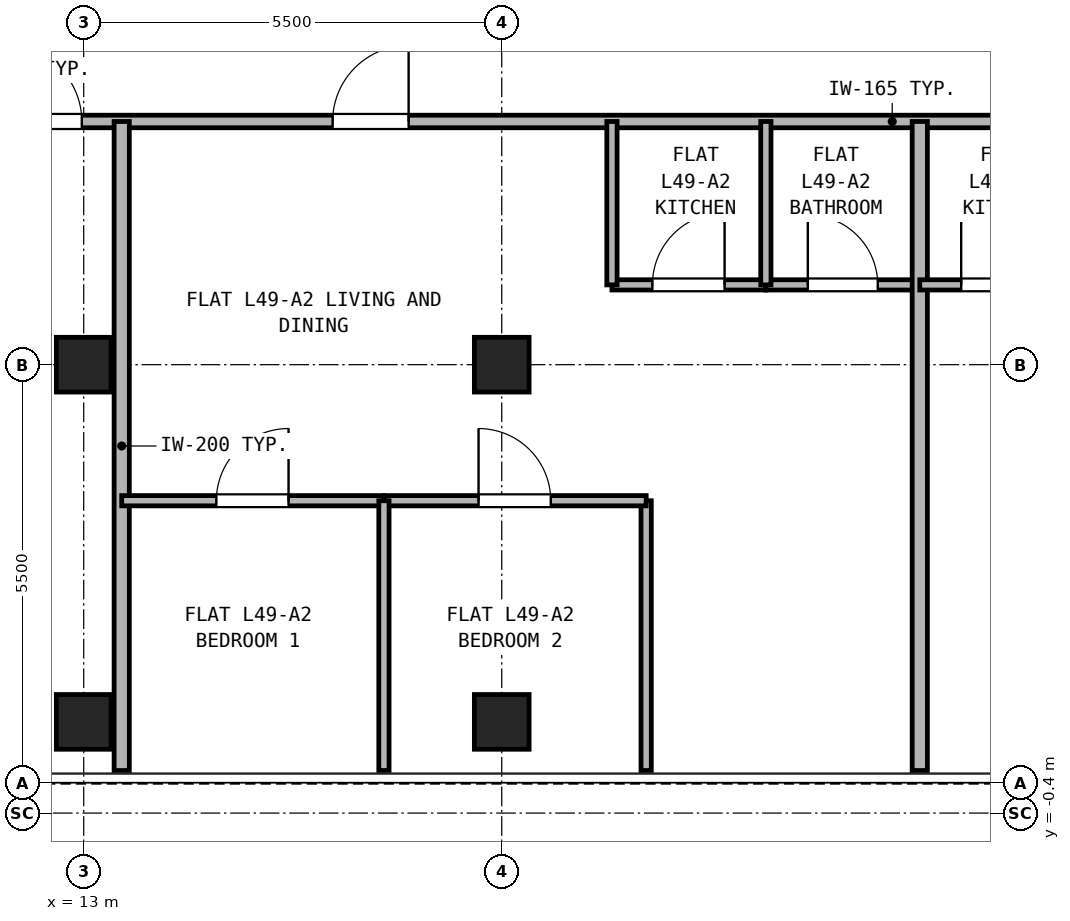
"""IFC4 building model, lengths in metres.
Left out: names, types, materials, properties, quantities, classifications, styles, units other than length and angle.
Written with IfcOpenShell. Run it as: python <this file> out.ifc"""

import sys

from ifc_helpers import new_model, si_unit, direction, frame, frame_2d, origin, origin_2d, place, context, subcontext, project, spatial, rectangle, hollow_rectangle, extrude, source, transform, mapped, element, fill, save


model = new_model("IFC4")
c1 = context("Model", 3, precision=1e-05, world=origin(), true_north=direction((0.0, 1.0)))
c2 = subcontext(c1, "Body", "Model", "MODEL_VIEW")
j1 = project(units=[si_unit("LENGTHUNIT", "METRE"), si_unit("PLANEANGLEUNIT", "RADIAN")], contexts=[c1])
p1 = place(None, origin())
s1 = spatial("IfcSite", under=j1, at=p1, CompositionType="ELEMENT")
p2 = place(p1, origin())
s2 = spatial("IfcBuilding", under=s1, at=p2, CompositionType="ELEMENT")
p3 = place(p2, frame((0.0, 0.0, 175.3)))
s3 = spatial("IfcBuildingStorey", under=s2, at=p3, CompositionType="ELEMENT", Elevation=175.3)
m1 = source(origin(), c2, "Body", "SweptSolid", [
    extrude(hollow_rectangle(XDim=0.72, YDim=0.72, WallThickness=0.04, at=origin_2d()), origin(), (0.0, 0.0, 1.0), 2.95),
])
for number, where, z_axis, x_axis in (
    (1, (13.0, 0.8, 0.0), (0.0, 0.0, 1.0), (1.0, 0.0, 0.0)),
    (2, (18.5, 0.8, 0.0), (0.0, 0.0, 1.0), (1.0, 0.0, 0.0)),
    (3, (13.0, 5.5, 0.0), (0.0, 0.0, 1.0), (1.0, 0.0, 0.0)),
    (4, (18.5, 5.5, 0.0), (0.0, 0.0, 1.0), (1.0, 0.0, 0.0)),
):
    element("IfcColumn", number, at=place(p3, frame(where, z_axis=z_axis, x_axis=x_axis)), inside=s3, PredefinedType="COLUMN", context=c2, shape_type="MappedRepresentation", body=[
        mapped(m1, transform((0.0, 0.0, 0.0), x_axis=(1.0, 0.0, 0.0), y_axis=(0.0, 1.0, 0.0), z_axis=(0.0, 0.0, 1.0), scale=1.0)),
    ])
p4 = place(p3, frame((0.16, 8.7, 0.0), z_axis=(0.0, 0.0, 1.0), x_axis=(1.0, 0.0, 0.0)))
e5 = element("IfcWall", 5, at=p4, inside=s3, PredefinedType="PARTITIONING", context=c2, shape_type="SweptSolid", body=[
    extrude(rectangle(XDim=41.48, YDim=0.165, at=frame_2d((20.74, 0.0))), origin(), (0.0, 0.0, 1.0), 2.583),
])
p5 = place(p4, frame((11.815, 0.0, 0.0)))
e6 = element("IfcOpeningElement", 6, at=p5, cuts=e5, PredefinedType="OPENING", context=c2, shape_type="SweptSolid", body=[
    extrude(rectangle(XDim=1.0, YDim=2.15, at=frame_2d((0.5, 1.075))), frame((0.0, 0.093, 0.0), z_axis=(0.0, -1.0, 0.0), x_axis=(1.0, 0.0, 0.0)), (0.0, 0.0, 1.0), 0.185),
])
p6 = place(p4, frame((16.115, 0.0, 0.0)))
e7 = element("IfcOpeningElement", 7, at=p6, cuts=e5, PredefinedType="OPENING", context=c2, shape_type="SweptSolid", body=[
    extrude(rectangle(XDim=1.0, YDim=2.15, at=frame_2d((0.5, 1.075))), frame((0.0, 0.093, 0.0), z_axis=(0.0, -1.0, 0.0), x_axis=(1.0, 0.0, 0.0)), (0.0, 0.0, 1.0), 0.185),
])
p7 = place(p4, frame((29.84, 0.0, 0.0)))
e8 = element("IfcOpeningElement", 8, at=p7, cuts=e5, PredefinedType="OPENING", context=c2, shape_type="SweptSolid", body=[
    extrude(rectangle(XDim=1.0, YDim=2.15, at=frame_2d((0.5, 1.075))), frame((0.0, 0.093, 0.0), z_axis=(0.0, -1.0, 0.0), x_axis=(1.0, 0.0, 0.0)), (0.0, 0.0, 1.0), 0.185),
])
p8 = place(p4, frame((33.615, 0.0, 0.0)))
e9 = element("IfcOpeningElement", 9, at=p8, cuts=e5, PredefinedType="OPENING", context=c2, shape_type="SweptSolid", body=[
    extrude(rectangle(XDim=1.0, YDim=2.15, at=frame_2d((0.5, 1.075))), frame((0.0, 0.093, 0.0), z_axis=(0.0, -1.0, 0.0), x_axis=(1.0, 0.0, 0.0)), (0.0, 0.0, 1.0), 0.185),
])
p9 = place(p3, frame((13.5, 0.16, 0.0), z_axis=(0.0, 0.0, 1.0), x_axis=(0.0, 1.0, 0.0)))
e10 = element("IfcWall", 10, at=p9, inside=s3, PredefinedType="PARTITIONING", context=c2, shape_type="SweptSolid", body=[
    extrude(rectangle(XDim=8.54, YDim=0.2, at=frame_2d((4.27, 0.0))), origin(), (0.0, 0.0, 1.0), 2.95),
])
p10 = place(p3, frame((19.95, 6.55, 0.0), z_axis=(0.0, 0.0, 1.0), x_axis=(1.0, 0.0, 0.0)))
e11 = element("IfcWall", 11, at=p10, inside=s3, PredefinedType="PARTITIONING", context=c2, shape_type="SweptSolid", body=[
    extrude(rectangle(XDim=2.025, YDim=0.135, at=frame_2d((1.013, 0.0))), origin(), (0.0, 0.0, 1.0), 2.95),
])
p11 = place(p10, frame((0.532, 0.0, 0.0)))
e12 = element("IfcOpeningElement", 12, at=p11, cuts=e11, PredefinedType="OPENING", context=c2, shape_type="SweptSolid", body=[
    extrude(rectangle(XDim=0.95, YDim=2.15, at=frame_2d((0.475, 1.075))), frame((0.0, 0.077, 0.0), z_axis=(0.0, -1.0, 0.0), x_axis=(1.0, 0.0, 0.0)), (0.0, 0.0, 1.0), 0.155),
])
p12 = place(p3, frame((21.975, 6.55, 0.0), z_axis=(0.0, 0.0, 1.0), x_axis=(1.0, 0.0, 0.0)))
e13 = element("IfcWall", 13, at=p12, inside=s3, PredefinedType="PARTITIONING", context=c2, shape_type="SweptSolid", body=[
    extrude(rectangle(XDim=2.025, YDim=0.135, at=frame_2d((1.012, 0.0))), origin(), (0.0, 0.0, 1.0), 2.95),
])
p13 = place(p12, frame((0.552, 0.0, 0.0)))
e14 = element("IfcOpeningElement", 14, at=p13, cuts=e13, PredefinedType="OPENING", context=c2, shape_type="SweptSolid", body=[
    extrude(rectangle(XDim=0.92, YDim=2.1, at=frame_2d((0.46, 1.05))), frame((0.0, 0.077, 0.0), z_axis=(0.0, -1.0, 0.0), x_axis=(1.0, 0.0, 0.0)), (0.0, 0.0, 1.0), 0.155),
])
for number, where, z_axis, x_axis in (
    (15, (19.95, 6.55, 0.0), (0.0, 0.0, 1.0), (0.0, 1.0, 0.0)),
    (16, (21.975, 6.55, 0.0), (0.0, 0.0, 1.0), (0.0, 1.0, 0.0)),
):
    element("IfcWall", number, at=place(p3, frame(where, z_axis=z_axis, x_axis=x_axis)), inside=s3, PredefinedType="PARTITIONING", context=c2, shape_type="SweptSolid", body=[
        extrude(rectangle(XDim=2.15, YDim=0.135, at=frame_2d((1.075, 0.0))), origin(), (0.0, 0.0, 1.0), 2.95),
    ])
p14 = place(p3, frame((20.4, 0.16, 0.0), z_axis=(0.0, 0.0, 1.0), x_axis=(0.0, 1.0, 0.0)))
e17 = element("IfcWall", 17, at=p14, inside=s3, PredefinedType="PARTITIONING", context=c2, shape_type="SweptSolid", body=[
    extrude(rectangle(XDim=3.55, YDim=0.135, at=frame_2d((1.775, 0.0))), origin(), (0.0, 0.0, 1.0), 2.95),
])
p15 = place(p3, frame((13.5, 3.71, 0.0), z_axis=(0.0, 0.0, 1.0), x_axis=(1.0, 0.0, 0.0)))
e18 = element("IfcWall", 18, at=p15, inside=s3, PredefinedType="PARTITIONING", context=c2, shape_type="SweptSolid", body=[
    extrude(rectangle(XDim=3.45, YDim=0.135, at=frame_2d((1.725, 0.0))), origin(), (0.0, 0.0, 1.0), 2.95),
])
p16 = place(p15, frame((1.245, 0.0, 0.0)))
e19 = element("IfcOpeningElement", 19, at=p16, cuts=e18, PredefinedType="OPENING", context=c2, shape_type="SweptSolid", body=[
    extrude(rectangle(XDim=0.95, YDim=2.15, at=frame_2d((0.475, 1.075))), frame((0.0, 0.077, 0.0), z_axis=(0.0, -1.0, 0.0), x_axis=(1.0, 0.0, 0.0)), (0.0, 0.0, 1.0), 0.155),
])
p17 = place(p3, frame((16.95, 3.71, 0.0), z_axis=(0.0, 0.0, 1.0), x_axis=(1.0, 0.0, 0.0)))
e20 = element("IfcWall", 20, at=p17, inside=s3, PredefinedType="PARTITIONING", context=c2, shape_type="SweptSolid", body=[
    extrude(rectangle(XDim=3.45, YDim=0.135, at=frame_2d((1.725, 0.0))), origin(), (0.0, 0.0, 1.0), 2.95),
])
p18 = place(p17, frame((1.245, 0.0, 0.0)))
e21 = element("IfcOpeningElement", 21, at=p18, cuts=e20, PredefinedType="OPENING", context=c2, shape_type="SweptSolid", body=[
    extrude(rectangle(XDim=0.95, YDim=2.15, at=frame_2d((0.475, 1.075))), frame((0.0, 0.077, 0.0), z_axis=(0.0, -1.0, 0.0), x_axis=(1.0, 0.0, 0.0)), (0.0, 0.0, 1.0), 0.155),
])
p19 = place(p3, frame((16.95, 0.16, 0.0), z_axis=(0.0, 0.0, 1.0), x_axis=(0.0, 1.0, 0.0)))
e22 = element("IfcWall", 22, at=p19, inside=s3, PredefinedType="PARTITIONING", context=c2, shape_type="SweptSolid", body=[
    extrude(rectangle(XDim=3.55, YDim=0.135, at=frame_2d((1.775, 0.0))), origin(), (0.0, 0.0, 1.0), 2.95),
])
p20 = place(p3, frame((24.0, 0.16, 0.0), z_axis=(0.0, 0.0, 1.0), x_axis=(0.0, 1.0, 0.0)))
e23 = element("IfcWall", 23, at=p20, inside=s3, PredefinedType="PARTITIONING", context=c2, shape_type="SweptSolid", body=[
    extrude(rectangle(XDim=8.54, YDim=0.2, at=frame_2d((4.27, 0.0))), origin(), (0.0, 0.0, 1.0), 2.95),
])
p21 = place(p3, frame((24.0, 6.55, 0.0), z_axis=(0.0, 0.0, 1.0), x_axis=(1.0, 0.0, 0.0)))
e24 = element("IfcWall", 24, at=p21, inside=s3, PredefinedType="PARTITIONING", context=c2, shape_type="SweptSolid", body=[
    extrude(rectangle(XDim=2.05, YDim=0.135, at=frame_2d((1.025, 0.0))), origin(), (0.0, 0.0, 1.0), 2.95),
])
p22 = place(p21, frame((0.545, 0.0, 0.0)))
e25 = element("IfcOpeningElement", 25, at=p22, cuts=e24, PredefinedType="OPENING", context=c2, shape_type="SweptSolid", body=[
    extrude(rectangle(XDim=0.95, YDim=2.15, at=frame_2d((0.475, 1.075))), frame((0.0, 0.077, 0.0), z_axis=(0.0, -1.0, 0.0), x_axis=(1.0, 0.0, 0.0)), (0.0, 0.0, 1.0), 0.155),
])
p23 = place(p5, frame((1.0, 0.0, 0.0), z_axis=(0.0, 0.0, 1.0), x_axis=(-1.0, 0.0, 0.0)))
e26 = element("IfcDoor", 26, at=p23, inside=s3, OperationType="SINGLE_SWING_LEFT", PredefinedType="DOOR", context=c2, shape_type="SweptSolid", body=[
    extrude(rectangle(XDim=1.0, YDim=2.15, at=frame_2d((0.5, 1.075))), frame((0.0, 0.025, 0.0), z_axis=(0.0, -1.0, 0.0), x_axis=(1.0, 0.0, 0.0)), (0.0, 0.0, 1.0), 0.05),
])
fill(e6, e26)
p24 = place(p11, origin())
e27 = element("IfcDoor", 27, at=p24, inside=s3, OperationType="SINGLE_SWING_RIGHT", PredefinedType="DOOR", context=c2, shape_type="SweptSolid", body=[
    extrude(rectangle(XDim=0.95, YDim=2.15, at=frame_2d((0.475, 1.075))), frame((0.0, 0.025, 0.0), z_axis=(0.0, -1.0, 0.0), x_axis=(1.0, 0.0, 0.0)), (0.0, 0.0, 1.0), 0.05),
])
fill(e12, e27)
p25 = place(p13, origin())
e28 = element("IfcDoor", 28, at=p25, inside=s3, OperationType="SINGLE_SWING_LEFT", PredefinedType="DOOR", context=c2, shape_type="SweptSolid", body=[
    extrude(rectangle(XDim=0.92, YDim=2.1, at=frame_2d((0.46, 1.05))), frame((0.0, 0.025, 0.0), z_axis=(0.0, -1.0, 0.0), x_axis=(1.0, 0.0, 0.0)), (0.0, 0.0, 1.0), 0.05),
])
fill(e14, e28)
p26 = place(p16, frame((0.95, 0.0, 0.0), z_axis=(0.0, 0.0, 1.0), x_axis=(-1.0, 0.0, 0.0)))
e29 = element("IfcDoor", 29, at=p26, inside=s3, OperationType="SINGLE_SWING_RIGHT", PredefinedType="DOOR", context=c2, shape_type="SweptSolid", body=[
    extrude(rectangle(XDim=0.95, YDim=2.15, at=frame_2d((0.475, 1.075))), frame((0.0, 0.025, 0.0), z_axis=(0.0, -1.0, 0.0), x_axis=(1.0, 0.0, 0.0)), (0.0, 0.0, 1.0), 0.05),
])
fill(e19, e29)
p27 = place(p18, frame((0.95, 0.0, 0.0), z_axis=(0.0, 0.0, 1.0), x_axis=(-1.0, 0.0, 0.0)))
e30 = element("IfcDoor", 30, at=p27, inside=s3, OperationType="SINGLE_SWING_LEFT", PredefinedType="DOOR", context=c2, shape_type="SweptSolid", body=[
    extrude(rectangle(XDim=0.95, YDim=2.15, at=frame_2d((0.475, 1.075))), frame((0.0, 0.025, 0.0), z_axis=(0.0, -1.0, 0.0), x_axis=(1.0, 0.0, 0.0)), (0.0, 0.0, 1.0), 0.05),
])
fill(e21, e30)
p28 = place(p6, frame((1.0, 0.0, 0.0), z_axis=(0.0, 0.0, 1.0), x_axis=(-1.0, 0.0, 0.0)))
e31 = element("IfcDoor", 31, at=p28, inside=s3, OperationType="SINGLE_SWING_RIGHT", PredefinedType="DOOR", context=c2, shape_type="SweptSolid", body=[
    extrude(rectangle(XDim=1.0, YDim=2.15, at=frame_2d((0.5, 1.075))), frame((0.0, 0.025, 0.0), z_axis=(0.0, -1.0, 0.0), x_axis=(1.0, 0.0, 0.0)), (0.0, 0.0, 1.0), 0.05),
])
fill(e7, e31)
p29 = place(p22, origin())
e32 = element("IfcDoor", 32, at=p29, inside=s3, OperationType="SINGLE_SWING_LEFT", PredefinedType="DOOR", context=c2, shape_type="SweptSolid", body=[
    extrude(rectangle(XDim=0.95, YDim=2.15, at=frame_2d((0.475, 1.075))), frame((0.0, 0.025, 0.0), z_axis=(0.0, -1.0, 0.0), x_axis=(1.0, 0.0, 0.0)), (0.0, 0.0, 1.0), 0.05),
])
fill(e25, e32)
save(model, sys.argv[1])
